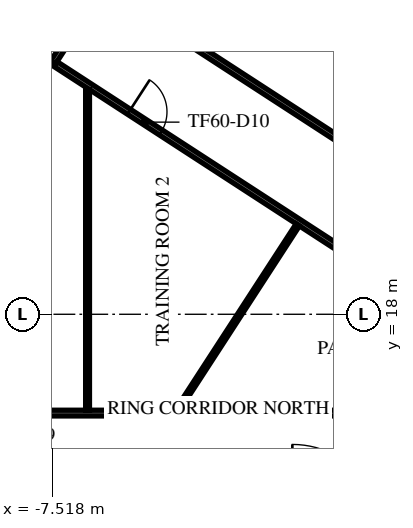
"""IFC4 building model, lengths in metres.
Left out: names, types, materials, properties, quantities, classifications, styles, units other than length and angle.
Written with IfcOpenShell. Run it as: python <this file> out.ifc"""

import sys

from ifc_helpers import new_model, si_unit, direction, frame, frame_2d, origin, place, context, subcontext, project, spatial, rectangle, extrude, element, fill, save


model = new_model("IFC4")
c1 = context("Model", 3, precision=1e-05, world=origin(), true_north=direction((0.0, 1.0)))
c2 = subcontext(c1, "Body", "Model", "MODEL_VIEW")
j1 = project(units=[si_unit("LENGTHUNIT", "METRE"), si_unit("PLANEANGLEUNIT", "RADIAN")], contexts=[c1])
p1 = place(None, origin())
s1 = spatial("IfcSite", under=j1, at=p1, CompositionType="ELEMENT")
p2 = place(p1, origin())
s2 = spatial("IfcBuilding", under=s1, at=p2, CompositionType="ELEMENT")
p3 = place(p2, frame((0.0, 0.0, 254.9)))
s3 = spatial("IfcBuildingStorey", under=s2, at=p3, CompositionType="ELEMENT", Elevation=254.9)
p4 = place(p3, frame((-6.281, 33.292, 0.0), z_axis=(0.0, 0.0, 1.0), x_axis=(-0.544637268583, -0.838671715077, 0.0)))
e1 = element("IfcWall", 1, at=p4, inside=s3, PredefinedType="STANDARD", context=c2, shape_type="SweptSolid", body=[
    extrude(rectangle(XDim=48.843, YDim=0.6, at=frame_2d((24.422, 0.0))), origin(), (0.0, 0.0, 1.0), 3.64),
])
p5 = place(p4, frame((1.22, 0.0, 0.9)))
e2 = element("IfcOpeningElement", 2, at=p5, cuts=e1, PredefinedType="OPENING", context=c2, shape_type="SweptSolid", body=[
    extrude(rectangle(XDim=2.0, YDim=2.1, at=frame_2d((1.0, 1.05))), frame((0.0, 0.31, 0.0), z_axis=(0.0, -1.0, 0.0), x_axis=(1.0, 0.0, 0.0)), (0.0, 0.0, 1.0), 0.62),
])
p6 = place(p4, frame((5.66, 0.0, 0.9)))
e3 = element("IfcOpeningElement", 3, at=p6, cuts=e1, PredefinedType="OPENING", context=c2, shape_type="SweptSolid", body=[
    extrude(rectangle(XDim=2.0, YDim=2.1, at=frame_2d((1.0, 1.05))), frame((0.0, 0.31, 0.0), z_axis=(0.0, -1.0, 0.0), x_axis=(1.0, 0.0, 0.0)), (0.0, 0.0, 1.0), 0.62),
])
p7 = place(p4, frame((14.541, 0.0, 0.9)))
e4 = element("IfcOpeningElement", 4, at=p7, cuts=e1, PredefinedType="OPENING", context=c2, shape_type="SweptSolid", body=[
    extrude(rectangle(XDim=2.0, YDim=2.1, at=frame_2d((1.0, 1.05))), frame((0.0, 0.31, 0.0), z_axis=(0.0, -1.0, 0.0), x_axis=(1.0, 0.0, 0.0)), (0.0, 0.0, 1.0), 0.62),
])
p8 = place(p4, frame((18.981, 0.0, 0.9)))
e5 = element("IfcOpeningElement", 5, at=p8, cuts=e1, PredefinedType="OPENING", context=c2, shape_type="SweptSolid", body=[
    extrude(rectangle(XDim=2.0, YDim=2.1, at=frame_2d((1.0, 1.05))), frame((0.0, 0.31, 0.0), z_axis=(0.0, -1.0, 0.0), x_axis=(1.0, 0.0, 0.0)), (0.0, 0.0, 1.0), 0.62),
])
p9 = place(p4, frame((23.422, 0.0, 0.9)))
e6 = element("IfcOpeningElement", 6, at=p9, cuts=e1, PredefinedType="OPENING", context=c2, shape_type="SweptSolid", body=[
    extrude(rectangle(XDim=2.0, YDim=2.1, at=frame_2d((1.0, 1.05))), frame((0.0, 0.31, 0.0), z_axis=(0.0, -1.0, 0.0), x_axis=(1.0, 0.0, 0.0)), (0.0, 0.0, 1.0), 0.62),
])
p10 = place(p4, frame((27.862, 0.0, 0.9)))
e7 = element("IfcOpeningElement", 7, at=p10, cuts=e1, PredefinedType="OPENING", context=c2, shape_type="SweptSolid", body=[
    extrude(rectangle(XDim=2.0, YDim=2.1, at=frame_2d((1.0, 1.05))), frame((0.0, 0.31, 0.0), z_axis=(0.0, -1.0, 0.0), x_axis=(1.0, 0.0, 0.0)), (0.0, 0.0, 1.0), 0.62),
])
p11 = place(p4, frame((32.302, 0.0, 0.9)))
e8 = element("IfcOpeningElement", 8, at=p11, cuts=e1, PredefinedType="OPENING", context=c2, shape_type="SweptSolid", body=[
    extrude(rectangle(XDim=2.0, YDim=2.1, at=frame_2d((1.0, 1.05))), frame((0.0, 0.31, 0.0), z_axis=(0.0, -1.0, 0.0), x_axis=(1.0, 0.0, 0.0)), (0.0, 0.0, 1.0), 0.62),
])
p12 = place(p4, frame((36.742, 0.0, 0.9)))
e9 = element("IfcOpeningElement", 9, at=p12, cuts=e1, PredefinedType="OPENING", context=c2, shape_type="SweptSolid", body=[
    extrude(rectangle(XDim=2.0, YDim=2.1, at=frame_2d((1.0, 1.05))), frame((0.0, 0.31, 0.0), z_axis=(0.0, -1.0, 0.0), x_axis=(1.0, 0.0, 0.0)), (0.0, 0.0, 1.0), 0.62),
])
p13 = place(p4, frame((41.183, 0.0, 0.9)))
e10 = element("IfcOpeningElement", 10, at=p13, cuts=e1, PredefinedType="OPENING", context=c2, shape_type="SweptSolid", body=[
    extrude(rectangle(XDim=2.0, YDim=2.1, at=frame_2d((1.0, 1.05))), frame((0.0, 0.31, 0.0), z_axis=(0.0, -1.0, 0.0), x_axis=(1.0, 0.0, 0.0)), (0.0, 0.0, 1.0), 0.62),
])
p14 = place(p4, frame((45.623, 0.0, 0.9)))
e11 = element("IfcOpeningElement", 11, at=p14, cuts=e1, PredefinedType="OPENING", context=c2, shape_type="SweptSolid", body=[
    extrude(rectangle(XDim=2.0, YDim=2.1, at=frame_2d((1.0, 1.05))), frame((0.0, 0.31, 0.0), z_axis=(0.0, -1.0, 0.0), x_axis=(1.0, 0.0, 0.0)), (0.0, 0.0, 1.0), 0.62),
])
p15 = place(p3, frame((-15.325, 15.4, 0.0), z_axis=(0.0, 0.0, 1.0), x_axis=(1.0, 0.0, 0.0)))
e12 = element("IfcWall", 12, at=p15, inside=s3, PredefinedType="PARTITIONING", context=c2, shape_type="SweptSolid", body=[
    extrude(rectangle(XDim=22.035, YDim=0.15, at=frame_2d((11.018, 0.0))), origin(), (0.0, 0.0, 1.0), 3.24),
])
p16 = place(p15, frame((6.3, 0.0, 0.0)))
e13 = element("IfcOpeningElement", 13, at=p16, cuts=e12, PredefinedType="OPENING", context=c2, shape_type="SweptSolid", body=[
    extrude(rectangle(XDim=1.0, YDim=2.1, at=frame_2d((0.5, 1.05))), frame((0.0, 0.085, 0.0), z_axis=(0.0, -1.0, 0.0), x_axis=(1.0, 0.0, 0.0)), (0.0, 0.0, 1.0), 0.17),
])
p17 = place(p15, frame((17.851, 0.0, 0.0)))
e14 = element("IfcOpeningElement", 14, at=p17, cuts=e12, PredefinedType="OPENING", context=c2, shape_type="SweptSolid", body=[
    extrude(rectangle(XDim=1.0, YDim=2.1, at=frame_2d((0.5, 1.05))), frame((0.0, 0.085, 0.0), z_axis=(0.0, -1.0, 0.0), x_axis=(1.0, 0.0, 0.0)), (0.0, 0.0, 1.0), 0.17),
])
p18 = place(p3, frame((-7.497, 24.626, 0.0), z_axis=(0.0, 0.0, 1.0), x_axis=(0.544612876689, 0.838687554781, 0.0)))
e15 = element("IfcWall", 15, at=p18, inside=s3, PredefinedType="PARTITIONING", context=c2, shape_type="SweptSolid", body=[
    extrude(rectangle(XDim=2.4, YDim=0.15, at=frame_2d((1.2, 0.0))), origin(), (0.0, 0.0, 1.0), 3.04),
])
p19 = place(p3, frame((-7.434, 24.585, 0.0), z_axis=(0.0, 0.0, 1.0), x_axis=(0.838669191056, -0.544641155232, 0.0)))
e16 = element("IfcWall", 16, at=p19, inside=s3, PredefinedType="PARTITIONING", context=c2, shape_type="SweptSolid", body=[
    extrude(rectangle(XDim=16.612, YDim=0.15, at=frame_2d((8.306, 0.0))), origin(), (0.0, 0.0, 1.0), 3.04),
])
p20 = place(p19, frame((2.307, 0.0, 0.0)))
e17 = element("IfcOpeningElement", 17, at=p20, cuts=e16, PredefinedType="OPENING", context=c2, shape_type="SweptSolid", body=[
    extrude(rectangle(XDim=1.0, YDim=2.1, at=frame_2d((0.5, 1.05))), frame((0.0, 0.085, 0.0), z_axis=(0.0, -1.0, 0.0), x_axis=(1.0, 0.0, 0.0)), (0.0, 0.0, 1.0), 0.17),
])
p21 = place(p3, frame((-6.127, 26.598, 0.0), z_axis=(0.0, 0.0, 1.0), x_axis=(0.838670911559, -0.544638505897, 0.0)))
e18 = element("IfcWall", 18, at=p21, inside=s3, PredefinedType="PARTITIONING", context=c2, shape_type="SweptSolid", body=[
    extrude(rectangle(XDim=39.325, YDim=0.15, at=frame_2d((19.663, 0.0))), origin(), (0.0, 0.0, 1.0), 3.04),
])
p22 = place(p21, frame((9.3, 0.0, 0.0)))
e19 = element("IfcOpeningElement", 19, at=p22, cuts=e18, PredefinedType="OPENING", context=c2, shape_type="SweptSolid", body=[
    extrude(rectangle(XDim=1.8, YDim=2.1, at=frame_2d((0.9, 1.05))), frame((0.0, 0.085, 0.0), z_axis=(0.0, -1.0, 0.0), x_axis=(1.0, 0.0, 0.0)), (0.0, 0.0, 1.0), 0.17),
])
p23 = place(p21, frame((12.185, 0.0, 0.0)))
e20 = element("IfcOpeningElement", 20, at=p23, cuts=e18, PredefinedType="OPENING", context=c2, shape_type="SweptSolid", body=[
    extrude(rectangle(XDim=1.0, YDim=2.1, at=frame_2d((0.5, 1.05))), frame((0.0, 0.085, 0.0), z_axis=(0.0, -1.0, 0.0), x_axis=(1.0, 0.0, 0.0)), (0.0, 0.0, 1.0), 0.17),
])
p24 = place(p21, frame((23.155, 0.0, 0.0)))
e21 = element("IfcOpeningElement", 21, at=p24, cuts=e18, PredefinedType="OPENING", context=c2, shape_type="SweptSolid", body=[
    extrude(rectangle(XDim=1.0, YDim=2.1, at=frame_2d((0.5, 1.05))), frame((0.0, 0.085, 0.0), z_axis=(0.0, -1.0, 0.0), x_axis=(1.0, 0.0, 0.0)), (0.0, 0.0, 1.0), 0.17),
])
p25 = place(p21, frame((30.544, 0.0, 0.0)))
e22 = element("IfcOpeningElement", 22, at=p25, cuts=e18, PredefinedType="OPENING", context=c2, shape_type="SweptSolid", body=[
    extrude(rectangle(XDim=1.0, YDim=2.1, at=frame_2d((0.5, 1.05))), frame((0.0, 0.085, 0.0), z_axis=(0.0, -1.0, 0.0), x_axis=(1.0, 0.0, 0.0)), (0.0, 0.0, 1.0), 0.17),
])
p26 = place(p21, frame((36.099, 0.0, 0.0)))
e23 = element("IfcOpeningElement", 23, at=p26, cuts=e18, PredefinedType="OPENING", context=c2, shape_type="SweptSolid", body=[
    extrude(rectangle(XDim=1.0, YDim=2.1, at=frame_2d((0.5, 1.05))), frame((0.0, 0.085, 0.0), z_axis=(0.0, -1.0, 0.0), x_axis=(1.0, 0.0, 0.0)), (0.0, 0.0, 1.0), 0.17),
])
p27 = place(p3, frame((-6.589, 15.475, 0.0), z_axis=(0.0, 0.0, 1.0), x_axis=(0.0, 1.0, 0.0)))
e24 = element("IfcWall", 24, at=p27, inside=s3, PredefinedType="PARTITIONING", context=c2, shape_type="SweptSolid", body=[
    extrude(rectangle(XDim=8.439, YDim=0.1, at=frame_2d((4.219, 0.0))), origin(), (0.0, 0.0, 1.0), 3.64),
])
p28 = place(p3, frame((-4.208, 15.502, 0.0), z_axis=(0.0, 0.0, 1.0), x_axis=(0.54461893606, 0.838683620017, 0.0)))
e25 = element("IfcWall", 25, at=p28, inside=s3, PredefinedType="PARTITIONING", context=c2, shape_type="SweptSolid", body=[
    extrude(rectangle(XDim=5.785, YDim=0.1, at=frame_2d((2.893, 0.0))), origin(), (0.0, 0.0, 1.0), 3.24),
])
p29 = place(p20, frame((1.0, 0.0, 0.0), z_axis=(0.0, 0.0, 1.0), x_axis=(-1.0, 0.0, 0.0)))
e26 = element("IfcDoor", 26, at=p29, inside=s3, OperationType="SINGLE_SWING_RIGHT", PredefinedType="DOOR", context=c2, shape_type="SweptSolid", body=[
    extrude(rectangle(XDim=1.0, YDim=2.1, at=frame_2d((0.5, 1.05))), frame((0.0, 0.025, 0.0), z_axis=(0.0, -1.0, 0.0), x_axis=(1.0, 0.0, 0.0)), (0.0, 0.0, 1.0), 0.05),
])
fill(e17, e26)
save(model, sys.argv[1])
